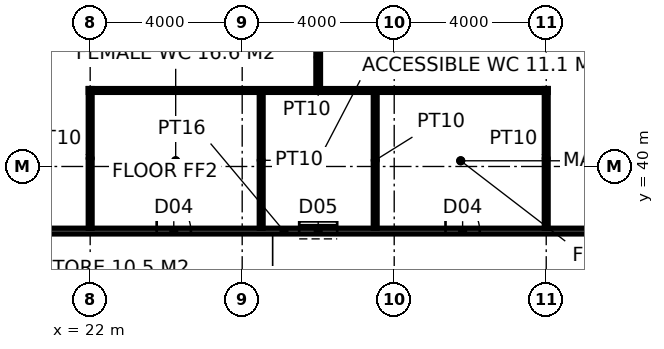
"""IFC4 building model, lengths in metres.
Left out: names, types, materials, properties, quantities, classifications, styles, units other than length and angle.
Written with IfcOpenShell. Run it as: python <this file> out.ifc"""

import sys

from ifc_helpers import new_model, si_unit, direction, frame, frame_2d, origin, place, context, subcontext, project, spatial, rectangle, extrude, element, fill, save


model = new_model("IFC4")
c1 = context("Model", 3, precision=1e-05, world=origin(), true_north=direction((0.0, 1.0)))
c2 = subcontext(c1, "Body", "Model", "MODEL_VIEW")
j1 = project(units=[si_unit("LENGTHUNIT", "METRE"), si_unit("PLANEANGLEUNIT", "RADIAN")], contexts=[c1])
p1 = place(None, origin())
s1 = spatial("IfcSite", under=j1, at=p1, CompositionType="ELEMENT")
p2 = place(p1, origin())
s2 = spatial("IfcBuilding", under=s1, at=p2, CompositionType="ELEMENT")
p3 = place(p2, frame((0.0, 0.0, 266.2)))
s3 = spatial("IfcBuildingStorey", under=s2, at=p3, CompositionType="ELEMENT", Elevation=266.2)
p4 = place(p3, frame((15.775, 38.3, 0.0), z_axis=(0.0, 0.0, 1.0), x_axis=(1.0, 0.0, 0.0)))
e1 = element("IfcWall", 1, at=p4, inside=s3, PredefinedType="PARTITIONING", context=c2, shape_type="SweptSolid", body=[
    extrude(rectangle(XDim=22.65, YDim=0.15, at=frame_2d((11.325, 0.0))), origin(), (0.0, 0.0, 1.0), 3.85),
])
p5 = place(p4, frame((7.975, 0.0, 0.0)))
e2 = element("IfcOpeningElement", 2, at=p5, cuts=e1, PredefinedType="OPENING", context=c2, shape_type="SweptSolid", body=[
    extrude(rectangle(XDim=0.9, YDim=2.1, at=frame_2d((0.45, 1.05))), frame((0.0, 0.085, 0.0), z_axis=(0.0, -1.0, 0.0), x_axis=(1.0, 0.0, 0.0)), (0.0, 0.0, 1.0), 0.17),
])
p6 = place(p4, frame((11.725, 0.0, 0.0)))
e3 = element("IfcOpeningElement", 3, at=p6, cuts=e1, PredefinedType="OPENING", context=c2, shape_type="SweptSolid", body=[
    extrude(rectangle(XDim=1.0, YDim=2.1, at=frame_2d((0.5, 1.05))), frame((0.0, 0.085, 0.0), z_axis=(0.0, -1.0, 0.0), x_axis=(1.0, 0.0, 0.0)), (0.0, 0.0, 1.0), 0.17),
])
p7 = place(p4, frame((15.575, 0.0, 0.0)))
e4 = element("IfcOpeningElement", 4, at=p7, cuts=e1, PredefinedType="OPENING", context=c2, shape_type="SweptSolid", body=[
    extrude(rectangle(XDim=0.9, YDim=2.1, at=frame_2d((0.45, 1.05))), frame((0.0, 0.085, 0.0), z_axis=(0.0, -1.0, 0.0), x_axis=(1.0, 0.0, 0.0)), (0.0, 0.0, 1.0), 0.17),
])
for number, where, z_axis, x_axis in (
    (5, (22.0, 38.375, 0.0), (0.0, 0.0, 1.0), (0.0, 1.0, 0.0)),
    (6, (34.0, 38.375, 0.0), (0.0, 0.0, 1.0), (0.0, 1.0, 0.0)),
):
    element("IfcWall", number, at=place(p3, frame(where, z_axis=z_axis, x_axis=x_axis)), inside=s3, PredefinedType="PARTITIONING", context=c2, shape_type="SweptSolid", body=[
        extrude(rectangle(XDim=3.675, YDim=0.1, at=frame_2d((1.837, 0.0))), origin(), (0.0, 0.0, 1.0), 2.65),
    ])
p8 = place(p3, frame((21.95, 42.0, 0.0), z_axis=(0.0, 0.0, 1.0), x_axis=(1.0, 0.0, 0.0)))
e7 = element("IfcWall", 7, at=p8, inside=s3, PredefinedType="PARTITIONING", context=c2, shape_type="SweptSolid", body=[
    extrude(rectangle(XDim=12.1, YDim=0.1, at=frame_2d((6.05, 0.0))), origin(), (0.0, 0.0, 1.0), 3.85),
])
for number, where, z_axis, x_axis in (
    (8, (26.5, 38.375, 0.0), (0.0, 0.0, 1.0), (0.0, 1.0, 0.0)),
    (9, (29.5, 38.375, 0.0), (0.0, 0.0, 1.0), (0.0, 1.0, 0.0)),
):
    element("IfcWall", number, at=place(p3, frame(where, z_axis=z_axis, x_axis=x_axis)), inside=s3, PredefinedType="PARTITIONING", context=c2, shape_type="SweptSolid", body=[
        extrude(rectangle(XDim=3.575, YDim=0.1, at=frame_2d((1.788, 0.0))), origin(), (0.0, 0.0, 1.0), 2.65),
    ])
p9 = place(p3, frame((28.0, 42.05, 0.0), z_axis=(0.0, 0.0, 1.0), x_axis=(0.0, 1.0, 0.0)))
e10 = element("IfcWall", 10, at=p9, inside=s3, PredefinedType="PARTITIONING", context=c2, shape_type="SweptSolid", body=[
    extrude(rectangle(XDim=1.65, YDim=0.12, at=frame_2d((0.825, 0.0))), origin(), (0.0, 0.0, 1.0), 3.85),
])
p10 = place(p5, origin())
e11 = element("IfcDoor", 11, at=p10, inside=s3, OperationType="SINGLE_SWING_LEFT", PredefinedType="DOOR", context=c2, shape_type="SweptSolid", body=[
    extrude(rectangle(XDim=0.9, YDim=2.1, at=frame_2d((0.45, 1.05))), frame((0.0, 0.025, 0.0), z_axis=(0.0, -1.0, 0.0), x_axis=(1.0, 0.0, 0.0)), (0.0, 0.0, 1.0), 0.05),
])
fill(e2, e11)
p11 = place(p6, origin())
e12 = element("IfcDoor", 12, at=p11, inside=s3, OperationType="SLIDING_TO_LEFT", PredefinedType="DOOR", context=c2, shape_type="SweptSolid", body=[
    extrude(rectangle(XDim=1.0, YDim=2.1, at=frame_2d((0.5, 1.05))), frame((0.0, 0.025, 0.0), z_axis=(0.0, -1.0, 0.0), x_axis=(1.0, 0.0, 0.0)), (0.0, 0.0, 1.0), 0.05),
])
fill(e3, e12)
p12 = place(p7, origin())
e13 = element("IfcDoor", 13, at=p12, inside=s3, OperationType="SINGLE_SWING_LEFT", PredefinedType="DOOR", context=c2, shape_type="SweptSolid", body=[
    extrude(rectangle(XDim=0.9, YDim=2.1, at=frame_2d((0.45, 1.05))), frame((0.0, 0.025, 0.0), z_axis=(0.0, -1.0, 0.0), x_axis=(1.0, 0.0, 0.0)), (0.0, 0.0, 1.0), 0.05),
])
fill(e4, e13)
save(model, sys.argv[1])
